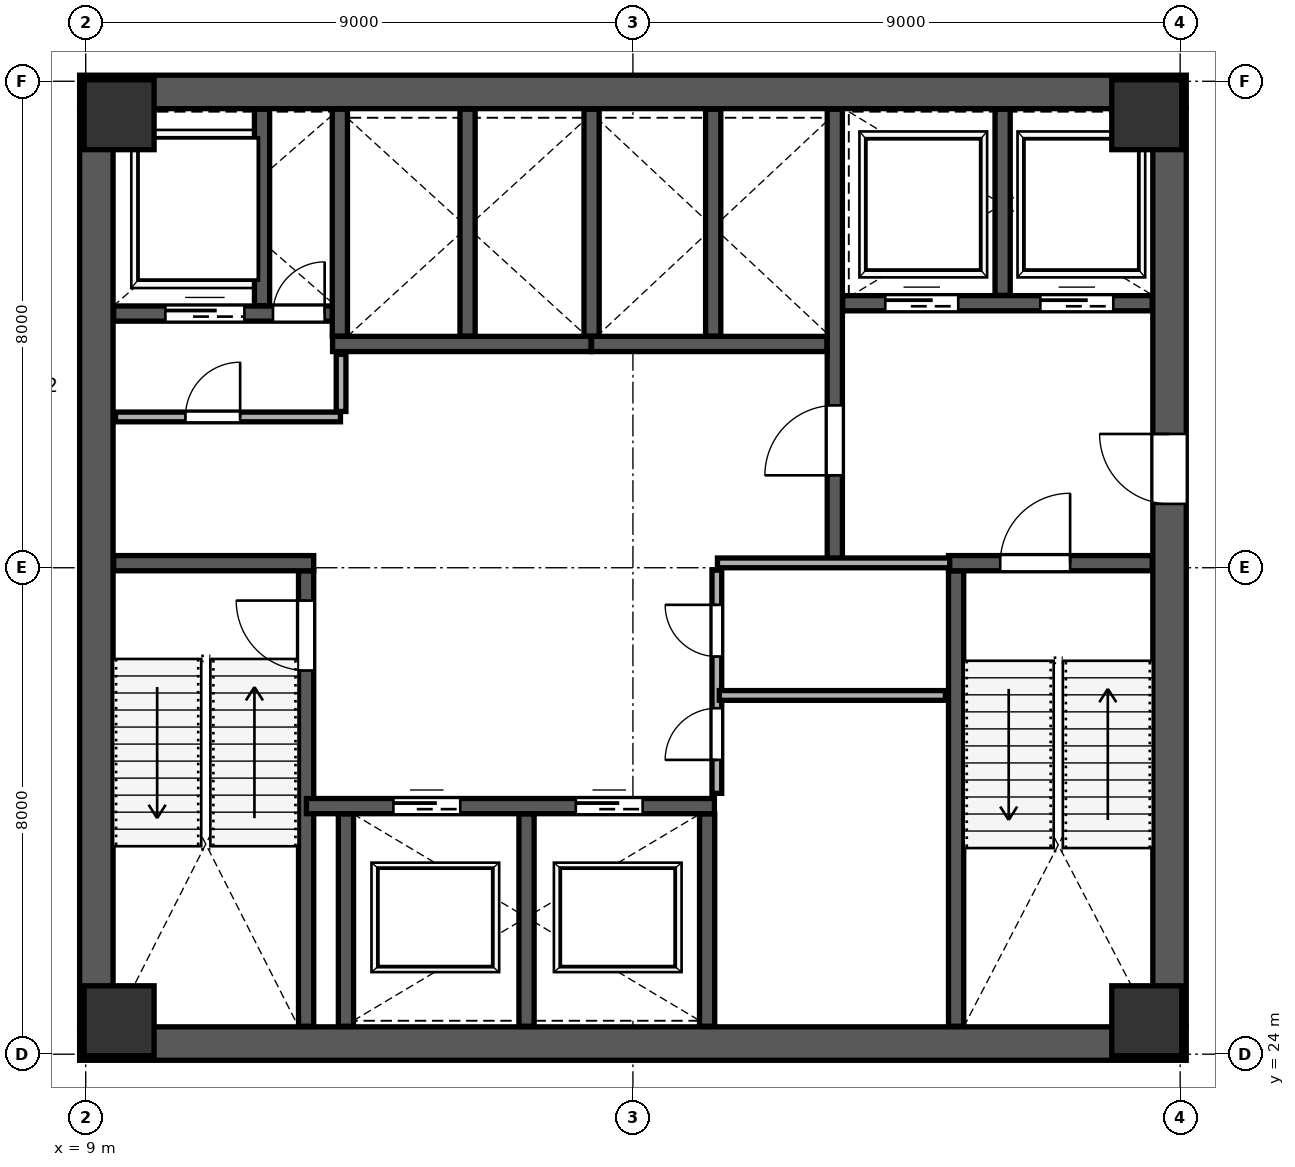
"""IFC4 building model, lengths in metres.
Left out: names, types, materials, properties, quantities, classifications, styles, units other than length and angle.
Written with IfcOpenShell. Run it as: python <this file> out.ifc"""

import sys

from ifc_helpers import new_model, si_unit, direction, frame, frame_2d, origin, origin_2d, place, context, subcontext, project, spatial, rectangle, extrude, source, transform, mapped, element, fill, save


model = new_model("IFC4")
c1 = context("Model", 3, precision=1e-05, world=origin(), true_north=direction((0.0, 1.0)))
c2 = subcontext(c1, "Body", "Model", "MODEL_VIEW")
j1 = project(units=[si_unit("LENGTHUNIT", "METRE"), si_unit("PLANEANGLEUNIT", "RADIAN")], contexts=[c1])
p1 = place(None, origin())
s1 = spatial("IfcSite", under=j1, at=p1, CompositionType="ELEMENT")
p2 = place(p1, origin())
s2 = spatial("IfcBuilding", under=s1, at=p2, CompositionType="ELEMENT")
p3 = place(p2, frame((0.0, 0.0, 108.4)))
s3 = spatial("IfcBuildingStorey", under=s2, at=p3, CompositionType="ELEMENT", Elevation=108.4)
m1 = source(origin(), c2, "Body", "SweptSolid", [
    extrude(rectangle(XDim=1.15, YDim=1.15, at=origin_2d()), origin(), (0.0, 0.0, 1.0), 4.199),
])
for number, where, z_axis, x_axis in (
    (1, (9.55, 24.55, 0.001), (0.0, 0.0, 1.0), (1.0, 0.0, 0.0)),
    (2, (26.45, 24.55, 0.001), (0.0, 0.0, 1.0), (1.0, 0.0, 0.0)),
    (3, (9.55, 39.45, 0.001), (0.0, 0.0, 1.0), (1.0, 0.0, 0.0)),
    (4, (26.45, 39.45, 0.001), (0.0, 0.0, 1.0), (1.0, 0.0, 0.0)),
):
    element("IfcColumn", number, at=place(p3, frame(where, z_axis=z_axis, x_axis=x_axis)), inside=s3, PredefinedType="COLUMN", context=c2, shape_type="MappedRepresentation", body=[
        mapped(m1, transform((0.0, 0.0, 0.0), scale=1.0)),
    ])
p4 = place(p3, frame((9.175, 24.45, 0.0), z_axis=(0.0, 0.0, 1.0), x_axis=(0.0, 1.0, 0.0)))
e5 = element("IfcWall", 5, at=p4, inside=s3, PredefinedType="SHEAR", context=c2, shape_type="SweptSolid", body=[
    extrude(rectangle(XDim=15.1, YDim=0.55, at=frame_2d((7.55, 0.0))), origin(), (0.0, 0.0, 1.0), 3.96),
])
p5 = place(p3, frame((26.825, 24.45, 0.0), z_axis=(0.0, 0.0, 1.0), x_axis=(0.0, 1.0, 0.0)))
e6 = element("IfcWall", 6, at=p5, inside=s3, PredefinedType="SHEAR", context=c2, shape_type="SweptSolid", body=[
    extrude(rectangle(XDim=15.1, YDim=0.55, at=frame_2d((7.55, 0.0))), origin(), (0.0, 0.0, 1.0), 3.96),
])
p6 = place(p5, frame((8.6, 0.0, 0.0)))
e7 = element("IfcOpeningElement", 7, at=p6, cuts=e6, PredefinedType="OPENING", context=c2, shape_type="SweptSolid", body=[
    extrude(rectangle(XDim=1.15, YDim=2.2, at=frame_2d((0.575, 1.1))), frame((0.0, 0.285, 0.0), z_axis=(0.0, -1.0, 0.0), x_axis=(1.0, 0.0, 0.0)), (0.0, 0.0, 1.0), 0.57),
])
for number, where, z_axis, x_axis in (
    (8, (8.9, 24.175, 0.0), (0.0, 0.0, 1.0), (1.0, 0.0, 0.0)),
    (9, (8.9, 39.825, 0.0), (0.0, 0.0, 1.0), (1.0, 0.0, 0.0)),
):
    element("IfcWall", number, at=place(p3, frame(where, z_axis=z_axis, x_axis=x_axis)), inside=s3, PredefinedType="SHEAR", context=c2, shape_type="SweptSolid", body=[
        extrude(rectangle(XDim=18.2, YDim=0.55, at=frame_2d((9.1, 0.0))), origin(), (0.0, 0.0, 1.0), 3.96),
    ])
p7 = place(p3, frame((12.625, 24.46, 0.0), z_axis=(0.0, 0.0, 1.0), x_axis=(0.0, 1.0, 0.0)))
e10 = element("IfcWall", 10, at=p7, inside=s3, PredefinedType="SHEAR", context=c2, shape_type="SweptSolid", body=[
    extrude(rectangle(XDim=7.49, YDim=0.25, at=frame_2d((3.745, 0.0))), origin(), (0.0, 0.0, 1.0), 3.96),
])
p8 = place(p7, frame((5.85, 0.0, 0.0)))
e11 = element("IfcOpeningElement", 11, at=p8, cuts=e10, PredefinedType="OPENING", context=c2, shape_type="SweptSolid", body=[
    extrude(rectangle(XDim=1.15, YDim=2.2, at=frame_2d((0.575, 1.1))), frame((0.0, 0.135, 0.0), z_axis=(0.0, -1.0, 0.0), x_axis=(1.0, 0.0, 0.0)), (0.0, 0.0, 1.0), 0.27),
])
p9 = place(p3, frame((9.46, 32.075, 0.0), z_axis=(0.0, 0.0, 1.0), x_axis=(1.0, 0.0, 0.0)))
e12 = element("IfcWall", 12, at=p9, inside=s3, PredefinedType="SHEAR", context=c2, shape_type="SweptSolid", body=[
    extrude(rectangle(XDim=3.29, YDim=0.25, at=frame_2d((1.645, 0.0))), origin(), (0.0, 0.0, 1.0), 3.96),
])
p10 = place(p3, frame((23.315, 24.46, 0.0), z_axis=(0.0, 0.0, 1.0), x_axis=(0.0, 1.0, 0.0)))
e13 = element("IfcWall", 13, at=p10, inside=s3, PredefinedType="SHEAR", context=c2, shape_type="SweptSolid", body=[
    extrude(rectangle(XDim=7.49, YDim=0.25, at=frame_2d((3.745, 0.0))), origin(), (0.0, 0.0, 1.0), 3.96),
])
p11 = place(p3, frame((23.19, 32.075, 0.0), z_axis=(0.0, 0.0, 1.0), x_axis=(1.0, 0.0, 0.0)))
e14 = element("IfcWall", 14, at=p11, inside=s3, PredefinedType="SHEAR", context=c2, shape_type="SweptSolid", body=[
    extrude(rectangle(XDim=3.35, YDim=0.25, at=frame_2d((1.675, 0.0))), origin(), (0.0, 0.0, 1.0), 3.96),
])
p12 = place(p11, frame((0.85, 0.0, 0.0)))
e15 = element("IfcOpeningElement", 15, at=p12, cuts=e14, PredefinedType="OPENING", context=c2, shape_type="SweptSolid", body=[
    extrude(rectangle(XDim=1.15, YDim=2.2, at=frame_2d((0.575, 1.1))), frame((0.0, 0.135, 0.0), z_axis=(0.0, -1.0, 0.0), x_axis=(1.0, 0.0, 0.0)), (0.0, 0.0, 1.0), 0.27),
])
p13 = place(p3, frame((21.32, 32.12, 0.0), z_axis=(0.0, 0.0, 1.0), x_axis=(0.0, 1.0, 0.0)))
e16 = element("IfcWall", 16, at=p13, inside=s3, PredefinedType="SHEAR", context=c2, shape_type="SweptSolid", body=[
    extrude(rectangle(XDim=7.42, YDim=0.25, at=frame_2d((3.71, 0.0))), origin(), (0.0, 0.0, 1.0), 3.96),
])
p14 = place(p13, frame((1.4, 0.0, 0.0)))
e17 = element("IfcOpeningElement", 17, at=p14, cuts=e16, PredefinedType="OPENING", context=c2, shape_type="SweptSolid", body=[
    extrude(rectangle(XDim=1.15, YDim=2.2, at=frame_2d((0.575, 1.1))), frame((0.0, 0.135, 0.0), z_axis=(0.0, -1.0, 0.0), x_axis=(1.0, 0.0, 0.0)), (0.0, 0.0, 1.0), 0.27),
])
p15 = place(p3, frame((9.46, 36.18, 0.0), z_axis=(0.0, 0.0, 1.0), x_axis=(1.0, 0.0, 0.0)))
e18 = element("IfcWall", 18, at=p15, inside=s3, PredefinedType="SHEAR", context=c2, shape_type="SweptSolid", body=[
    extrude(rectangle(XDim=3.79, YDim=0.25, at=frame_2d((1.895, 0.0))), origin(), (0.0, 0.0, 1.0), 3.96),
])
p16 = place(p15, frame((2.62, 0.0, 0.0)))
e19 = element("IfcOpeningElement", 19, at=p16, cuts=e18, PredefinedType="OPENING", context=c2, shape_type="SweptSolid", body=[
    extrude(rectangle(XDim=0.85, YDim=2.1, at=frame_2d((0.425, 1.05))), frame((0.0, 0.135, 0.0), z_axis=(0.0, -1.0, 0.0), x_axis=(1.0, 0.0, 0.0)), (0.0, 0.0, 1.0), 0.27),
])
p17 = place(p15, frame((0.85, 0.0, 0.0)))
e20 = element("IfcOpeningElement", 20, at=p17, cuts=e18, PredefinedType="OPENING", context=c2, shape_type="SweptSolid", body=[
    extrude(rectangle(XDim=1.3, YDim=2.25, at=frame_2d((0.65, 1.125))), frame((0.0, 0.135, 0.0), z_axis=(0.0, -1.0, 0.0), x_axis=(1.0, 0.0, 0.0)), (0.0, 0.0, 1.0), 0.27),
])
p18 = place(p3, frame((11.9, 36.31, 0.0), z_axis=(0.0, 0.0, 1.0), x_axis=(0.0, 1.0, 0.0)))
e21 = element("IfcWall", 21, at=p18, inside=s3, PredefinedType="SHEAR", context=c2, shape_type="SweptSolid", body=[
    extrude(rectangle(XDim=3.23, YDim=0.25, at=frame_2d((1.615, 0.0))), origin(), (0.0, 0.0, 1.0), 3.96),
])
p19 = place(p3, frame((21.45, 36.35, 0.0), z_axis=(0.0, 0.0, 1.0), x_axis=(1.0, 0.0, 0.0)))
e22 = element("IfcWall", 22, at=p19, inside=s3, PredefinedType="SHEAR", context=c2, shape_type="SweptSolid", body=[
    extrude(rectangle(XDim=5.09, YDim=0.25, at=frame_2d((2.545, 0.0))), origin(), (0.0, 0.0, 1.0), 3.96),
])
p20 = place(p19, frame((0.7, 0.0, 0.0)))
e23 = element("IfcOpeningElement", 23, at=p20, cuts=e22, PredefinedType="OPENING", context=c2, shape_type="SweptSolid", body=[
    extrude(rectangle(XDim=1.2, YDim=2.2, at=frame_2d((0.6, 1.1))), frame((0.0, 0.135, 0.0), z_axis=(0.0, -1.0, 0.0), x_axis=(1.0, 0.0, 0.0)), (0.0, 0.0, 1.0), 0.27),
])
p21 = place(p19, frame((3.25, 0.0, 0.0)))
e24 = element("IfcOpeningElement", 24, at=p21, cuts=e22, PredefinedType="OPENING", context=c2, shape_type="SweptSolid", body=[
    extrude(rectangle(XDim=1.2, YDim=2.2, at=frame_2d((0.6, 1.1))), frame((0.0, 0.135, 0.0), z_axis=(0.0, -1.0, 0.0), x_axis=(1.0, 0.0, 0.0)), (0.0, 0.0, 1.0), 0.27),
])
p22 = place(p3, frame((24.08, 36.48, 0.0), z_axis=(0.0, 0.0, 1.0), x_axis=(0.0, 1.0, 0.0)))
e25 = element("IfcWall", 25, at=p22, inside=s3, PredefinedType="SHEAR", context=c2, shape_type="SweptSolid", body=[
    extrude(rectangle(XDim=3.06, YDim=0.25, at=frame_2d((1.53, 0.0))), origin(), (0.0, 0.0, 1.0), 3.96),
])
p23 = place(p3, frame((12.63, 28.08, 0.0), z_axis=(0.0, 0.0, 1.0), x_axis=(1.0, 0.0, 0.0)))
e26 = element("IfcWall", 26, at=p23, inside=s3, PredefinedType="SHEAR", context=c2, shape_type="SweptSolid", body=[
    extrude(rectangle(XDim=6.71, YDim=0.25, at=frame_2d((3.355, 0.0))), origin(), (0.0, 0.0, 1.0), 3.96),
])
p24 = place(p23, frame((1.43, 0.0, 0.0)))
e27 = element("IfcOpeningElement", 27, at=p24, cuts=e26, PredefinedType="OPENING", context=c2, shape_type="SweptSolid", body=[
    extrude(rectangle(XDim=1.1, YDim=2.2, at=frame_2d((0.55, 1.1))), frame((0.0, 0.135, 0.0), z_axis=(0.0, -1.0, 0.0), x_axis=(1.0, 0.0, 0.0)), (0.0, 0.0, 1.0), 0.27),
])
p25 = place(p23, frame((4.43, 0.0, 0.0)))
e28 = element("IfcOpeningElement", 28, at=p25, cuts=e26, PredefinedType="OPENING", context=c2, shape_type="SweptSolid", body=[
    extrude(rectangle(XDim=1.1, YDim=2.2, at=frame_2d((0.55, 1.1))), frame((0.0, 0.135, 0.0), z_axis=(0.0, -1.0, 0.0), x_axis=(1.0, 0.0, 0.0)), (0.0, 0.0, 1.0), 0.27),
])
for number, where, z_axis, x_axis in (
    (29, (13.28, 24.46, 0.0), (0.0, 0.0, 1.0), (0.0, 1.0, 0.0)),
    (30, (16.25, 24.46, 0.0), (0.0, 0.0, 1.0), (0.0, 1.0, 0.0)),
    (31, (19.22, 24.46, 0.0), (0.0, 0.0, 1.0), (0.0, 1.0, 0.0)),
):
    element("IfcWall", number, at=place(p3, frame(where, z_axis=z_axis, x_axis=x_axis)), inside=s3, PredefinedType="SHEAR", context=c2, shape_type="SweptSolid", body=[
        extrude(rectangle(XDim=3.49, YDim=0.25, at=frame_2d((1.745, 0.0))), origin(), (0.0, 0.0, 1.0), 3.96),
    ])
p26 = place(p3, frame((13.06, 35.68, 0.0), z_axis=(0.0, 0.0, 1.0), x_axis=(1.0, 0.0, 0.0)))
e32 = element("IfcWall", 32, at=p26, inside=s3, PredefinedType="SHEAR", context=c2, shape_type="SweptSolid", body=[
    extrude(rectangle(XDim=4.25, YDim=0.25, at=frame_2d((2.125, 0.0))), origin(), (0.0, 0.0, 1.0), 3.96),
])
for number, where, z_axis, x_axis in (
    (33, (13.18, 35.81, 0.0), (0.0, 0.0, 1.0), (0.0, 1.0, 0.0)),
    (34, (15.28, 35.81, 0.0), (0.0, 0.0, 1.0), (0.0, 1.0, 0.0)),
):
    element("IfcWall", number, at=place(p3, frame(where, z_axis=z_axis, x_axis=x_axis)), inside=s3, PredefinedType="SHEAR", context=c2, shape_type="SweptSolid", body=[
        extrude(rectangle(XDim=3.73, YDim=0.25, at=frame_2d((1.865, 0.0))), origin(), (0.0, 0.0, 1.0), 3.96),
    ])
p27 = place(p3, frame((17.32, 35.68, 0.0), z_axis=(0.0, 0.0, 1.0), x_axis=(1.0, 0.0, 0.0)))
e35 = element("IfcWall", 35, at=p27, inside=s3, PredefinedType="SHEAR", context=c2, shape_type="SweptSolid", body=[
    extrude(rectangle(XDim=3.87, YDim=0.25, at=frame_2d((1.935, 0.0))), origin(), (0.0, 0.0, 1.0), 3.96),
])
for number, where, z_axis, x_axis in (
    (36, (17.32, 35.81, 0.0), (0.0, 0.0, 1.0), (0.0, 1.0, 0.0)),
    (37, (19.32, 35.81, 0.0), (0.0, 0.0, 1.0), (0.0, 1.0, 0.0)),
):
    element("IfcWall", number, at=place(p3, frame(where, z_axis=z_axis, x_axis=x_axis)), inside=s3, PredefinedType="SHEAR", context=c2, shape_type="SweptSolid", body=[
        extrude(rectangle(XDim=3.73, YDim=0.25, at=frame_2d((1.865, 0.0))), origin(), (0.0, 0.0, 1.0), 3.96),
    ])
p28 = place(p3, frame((9.49, 34.48, 0.0), z_axis=(0.0, 0.0, 1.0), x_axis=(1.0, 0.0, 0.0)))
e38 = element("IfcWall", 38, at=p28, inside=s3, PredefinedType="PARTITIONING", context=c2, shape_type="SweptSolid", body=[
    extrude(rectangle(XDim=3.7, YDim=0.16, at=frame_2d((1.85, 0.0))), origin(), (0.0, 0.0, 1.0), 3.96),
])
p29 = place(p28, frame((1.15, 0.0, 0.0)))
e39 = element("IfcOpeningElement", 39, at=p29, cuts=e38, PredefinedType="OPENING", context=c2, shape_type="SweptSolid", body=[
    extrude(rectangle(XDim=0.9, YDim=2.15, at=frame_2d((0.45, 1.075))), frame((0.0, 0.09, 0.0), z_axis=(0.0, -1.0, 0.0), x_axis=(1.0, 0.0, 0.0)), (0.0, 0.0, 1.0), 0.18),
])
p30 = place(p3, frame((13.2, 34.57, 0.0), z_axis=(0.0, 0.0, 1.0), x_axis=(0.0, 1.0, 0.0)))
e40 = element("IfcWall", 40, at=p30, inside=s3, PredefinedType="PARTITIONING", context=c2, shape_type="SweptSolid", body=[
    extrude(rectangle(XDim=0.94, YDim=0.16, at=frame_2d((0.47, 0.0))), origin(), (0.0, 0.0, 1.0), 3.96),
])
p31 = place(p3, frame((19.39, 32.08, 0.0), z_axis=(0.0, 0.0, 1.0), x_axis=(1.0, 0.0, 0.0)))
e41 = element("IfcWall", 41, at=p31, inside=s3, PredefinedType="PARTITIONING", context=c2, shape_type="SweptSolid", body=[
    extrude(rectangle(XDim=3.82, YDim=0.16, at=frame_2d((1.91, 0.0))), origin(), (0.0, 0.0, 1.0), 3.96),
])
p32 = place(p3, frame((19.38, 28.29, 0.0), z_axis=(0.0, 0.0, 1.0), x_axis=(0.0, 1.0, 0.0)))
e42 = element("IfcWall", 42, at=p32, inside=s3, PredefinedType="PARTITIONING", context=c2, shape_type="SweptSolid", body=[
    extrude(rectangle(XDim=3.67, YDim=0.16, at=frame_2d((1.835, 0.0))), origin(), (0.0, 0.0, 1.0), 3.96),
])
p33 = place(p32, frame((0.55, 0.0, 0.0)))
e43 = element("IfcOpeningElement", 43, at=p33, cuts=e42, PredefinedType="OPENING", context=c2, shape_type="SweptSolid", body=[
    extrude(rectangle(XDim=0.85, YDim=2.1, at=frame_2d((0.425, 1.05))), frame((0.0, 0.09, 0.0), z_axis=(0.0, -1.0, 0.0), x_axis=(1.0, 0.0, 0.0)), (0.0, 0.0, 1.0), 0.18),
])
p34 = place(p32, frame((2.25, 0.0, 0.0)))
e44 = element("IfcOpeningElement", 44, at=p34, cuts=e42, PredefinedType="OPENING", context=c2, shape_type="SweptSolid", body=[
    extrude(rectangle(XDim=0.85, YDim=2.1, at=frame_2d((0.425, 1.05))), frame((0.0, 0.09, 0.0), z_axis=(0.0, -1.0, 0.0), x_axis=(1.0, 0.0, 0.0)), (0.0, 0.0, 1.0), 0.18),
])
p35 = place(p3, frame((19.42, 29.9, 0.0), z_axis=(0.0, 0.0, 1.0), x_axis=(1.0, 0.0, 0.0)))
e45 = element("IfcWall", 45, at=p35, inside=s3, PredefinedType="PARTITIONING", context=c2, shape_type="SweptSolid", body=[
    extrude(rectangle(XDim=3.72, YDim=0.16, at=frame_2d((1.86, 0.0))), origin(), (0.0, 0.0, 1.0), 3.96),
])
p36 = place(p3, frame((8.071, 46.831, 0.0), z_axis=(0.0, 0.0, 1.0), x_axis=(0.965925848141, -0.258818963551, 0.0)))
e46 = element("IfcWall", 46, at=p36, inside=s3, PredefinedType="PARTITIONING", context=c2, shape_type="SweptSolid", body=[
    extrude(rectangle(XDim=26.16, YDim=0.115, at=frame_2d((13.08, 0.0))), origin(), (0.0, 0.0, 1.0), 3.96),
])
p37 = place(p36, frame((1.05, 0.0, 0.0)))
e47 = element("IfcOpeningElement", 47, at=p37, cuts=e46, PredefinedType="OPENING", context=c2, shape_type="SweptSolid", body=[
    extrude(rectangle(XDim=0.95, YDim=2.15, at=frame_2d((0.475, 1.075))), frame((0.0, 0.067, 0.0), z_axis=(0.0, -1.0, 0.0), x_axis=(1.0, 0.0, 0.0)), (0.0, 0.0, 1.0), 0.135),
])
p38 = place(p3, frame((25.906, 12.164, 0.0), z_axis=(0.0, 0.0, 1.0), x_axis=(0.258805595447, 0.965929430013, 0.0)))
e48 = element("IfcWall", 48, at=p38, inside=s3, PredefinedType="PARTITIONING", context=c2, shape_type="SweptSolid", body=[
    extrude(rectangle(XDim=19.78, YDim=0.16, at=frame_2d((9.89, 0.0))), origin(), (0.0, 0.0, 1.0), 3.96),
])
m2 = source(origin(), c2, "Body", "SweptSolid", [
    extrude(rectangle(XDim=1.15, YDim=2.2, at=frame_2d((0.575, 1.1))), frame((0.0, 0.025, 0.0), z_axis=(0.0, -1.0, 0.0), x_axis=(1.0, 0.0, 0.0)), (0.0, 0.0, 1.0), 0.05),
])
p39 = place(p8, origin())
e49 = element("IfcDoor", 49, at=p39, inside=s3, OperationType="SINGLE_SWING_RIGHT", PredefinedType="DOOR", context=c2, shape_type="MappedRepresentation", body=[
    mapped(m2, transform((0.0, 0.0, 0.0), scale=1.0)),
])
fill(e11, e49)
m3 = source(origin(), c2, "Body", "SweptSolid", [
    extrude(rectangle(XDim=1.15, YDim=2.2, at=frame_2d((0.575, 1.1))), frame((0.0, 0.025, 0.0), z_axis=(0.0, -1.0, 0.0), x_axis=(1.0, 0.0, 0.0)), (0.0, 0.0, 1.0), 0.05),
])
p40 = place(p14, origin())
e50 = element("IfcDoor", 50, at=p40, inside=s3, OperationType="SINGLE_SWING_LEFT", PredefinedType="DOOR", context=c2, shape_type="MappedRepresentation", body=[
    mapped(m3, transform((0.0, 0.0, 0.0), scale=1.0)),
])
fill(e17, e50)
p41 = place(p12, origin())
e51 = element("IfcDoor", 51, at=p41, inside=s3, OperationType="SINGLE_SWING_RIGHT", PredefinedType="DOOR", context=c2, shape_type="MappedRepresentation", body=[
    mapped(m2, transform((0.0, 0.0, 0.0), scale=1.0)),
])
fill(e15, e51)
p42 = place(p6, origin())
e52 = element("IfcDoor", 52, at=p42, inside=s3, OperationType="SINGLE_SWING_RIGHT", PredefinedType="DOOR", context=c2, shape_type="MappedRepresentation", body=[
    mapped(m3, transform((0.0, 0.0, 0.0), scale=1.0)),
])
fill(e7, e52)
m4 = source(origin(), c2, "Body", "SweptSolid", [
    extrude(rectangle(XDim=0.85, YDim=2.1, at=frame_2d((0.425, 1.05))), frame((0.0, 0.025, 0.0), z_axis=(0.0, -1.0, 0.0), x_axis=(1.0, 0.0, 0.0)), (0.0, 0.0, 1.0), 0.05),
])
p43 = place(p16, origin())
e53 = element("IfcDoor", 53, at=p43, inside=s3, OperationType="SINGLE_SWING_RIGHT", PredefinedType="DOOR", context=c2, shape_type="MappedRepresentation", body=[
    mapped(m4, transform((0.0, 0.0, 0.0), scale=1.0)),
])
fill(e19, e53)
m5 = source(origin(), c2, "Body", "SweptSolid", [
    extrude(rectangle(XDim=1.1, YDim=2.2, at=frame_2d((0.55, 1.1))), frame((0.0, 0.025, 0.0), z_axis=(0.0, -1.0, 0.0), x_axis=(1.0, 0.0, 0.0)), (0.0, 0.0, 1.0), 0.05),
])
p44 = place(p24, origin())
e54 = element("IfcDoor", 54, at=p44, inside=s3, OperationType="SLIDING_TO_LEFT", PredefinedType="DOOR", context=c2, shape_type="MappedRepresentation", body=[
    mapped(m5, transform((0.0, 0.0, 0.0), scale=1.0)),
])
fill(e27, e54)
p45 = place(p25, origin())
e55 = element("IfcDoor", 55, at=p45, inside=s3, OperationType="SLIDING_TO_RIGHT", PredefinedType="DOOR", context=c2, shape_type="MappedRepresentation", body=[
    mapped(m5, transform((0.0, 0.0, 0.0), scale=1.0)),
])
fill(e28, e55)
m6 = source(origin(), c2, "Body", "SweptSolid", [
    extrude(rectangle(XDim=1.2, YDim=2.2, at=frame_2d((0.6, 1.1))), frame((0.0, 0.025, 0.0), z_axis=(0.0, -1.0, 0.0), x_axis=(1.0, 0.0, 0.0)), (0.0, 0.0, 1.0), 0.05),
])
p46 = place(p20, origin())
e56 = element("IfcDoor", 56, at=p46, inside=s3, OperationType="SLIDING_TO_LEFT", PredefinedType="DOOR", context=c2, shape_type="MappedRepresentation", body=[
    mapped(m6, transform((0.0, 0.0, 0.0), scale=1.0)),
])
fill(e23, e56)
p47 = place(p21, origin())
e57 = element("IfcDoor", 57, at=p47, inside=s3, OperationType="SLIDING_TO_RIGHT", PredefinedType="DOOR", context=c2, shape_type="MappedRepresentation", body=[
    mapped(m6, transform((0.0, 0.0, 0.0), scale=1.0)),
])
fill(e24, e57)
m7 = source(origin(), c2, "Body", "SweptSolid", [
    extrude(rectangle(XDim=1.3, YDim=2.25, at=frame_2d((0.65, 1.125))), frame((0.0, 0.025, 0.0), z_axis=(0.0, -1.0, 0.0), x_axis=(1.0, 0.0, 0.0)), (0.0, 0.0, 1.0), 0.05),
])
p48 = place(p17, origin())
e58 = element("IfcDoor", 58, at=p48, inside=s3, OperationType="SLIDING_TO_LEFT", PredefinedType="DOOR", context=c2, shape_type="MappedRepresentation", body=[
    mapped(m7, transform((0.0, 0.0, 0.0), scale=1.0)),
])
fill(e20, e58)
m8 = source(origin(), c2, "Body", "SweptSolid", [
    extrude(rectangle(XDim=0.9, YDim=2.15, at=frame_2d((0.45, 1.075))), frame((0.0, 0.025, 0.0), z_axis=(0.0, -1.0, 0.0), x_axis=(1.0, 0.0, 0.0)), (0.0, 0.0, 1.0), 0.05),
])
p49 = place(p29, origin())
e59 = element("IfcDoor", 59, at=p49, inside=s3, OperationType="SINGLE_SWING_RIGHT", PredefinedType="DOOR", context=c2, shape_type="MappedRepresentation", body=[
    mapped(m8, transform((0.0, 0.0, 0.0), scale=1.0)),
])
fill(e39, e59)
p50 = place(p33, origin())
e60 = element("IfcDoor", 60, at=p50, inside=s3, OperationType="SINGLE_SWING_LEFT", PredefinedType="DOOR", context=c2, shape_type="MappedRepresentation", body=[
    mapped(m4, transform((0.0, 0.0, 0.0), scale=1.0)),
])
fill(e43, e60)
p51 = place(p34, origin())
e61 = element("IfcDoor", 61, at=p51, inside=s3, OperationType="SINGLE_SWING_RIGHT", PredefinedType="DOOR", context=c2, shape_type="MappedRepresentation", body=[
    mapped(m4, transform((0.0, 0.0, 0.0), scale=1.0)),
])
fill(e44, e61)
save(model, sys.argv[1])
